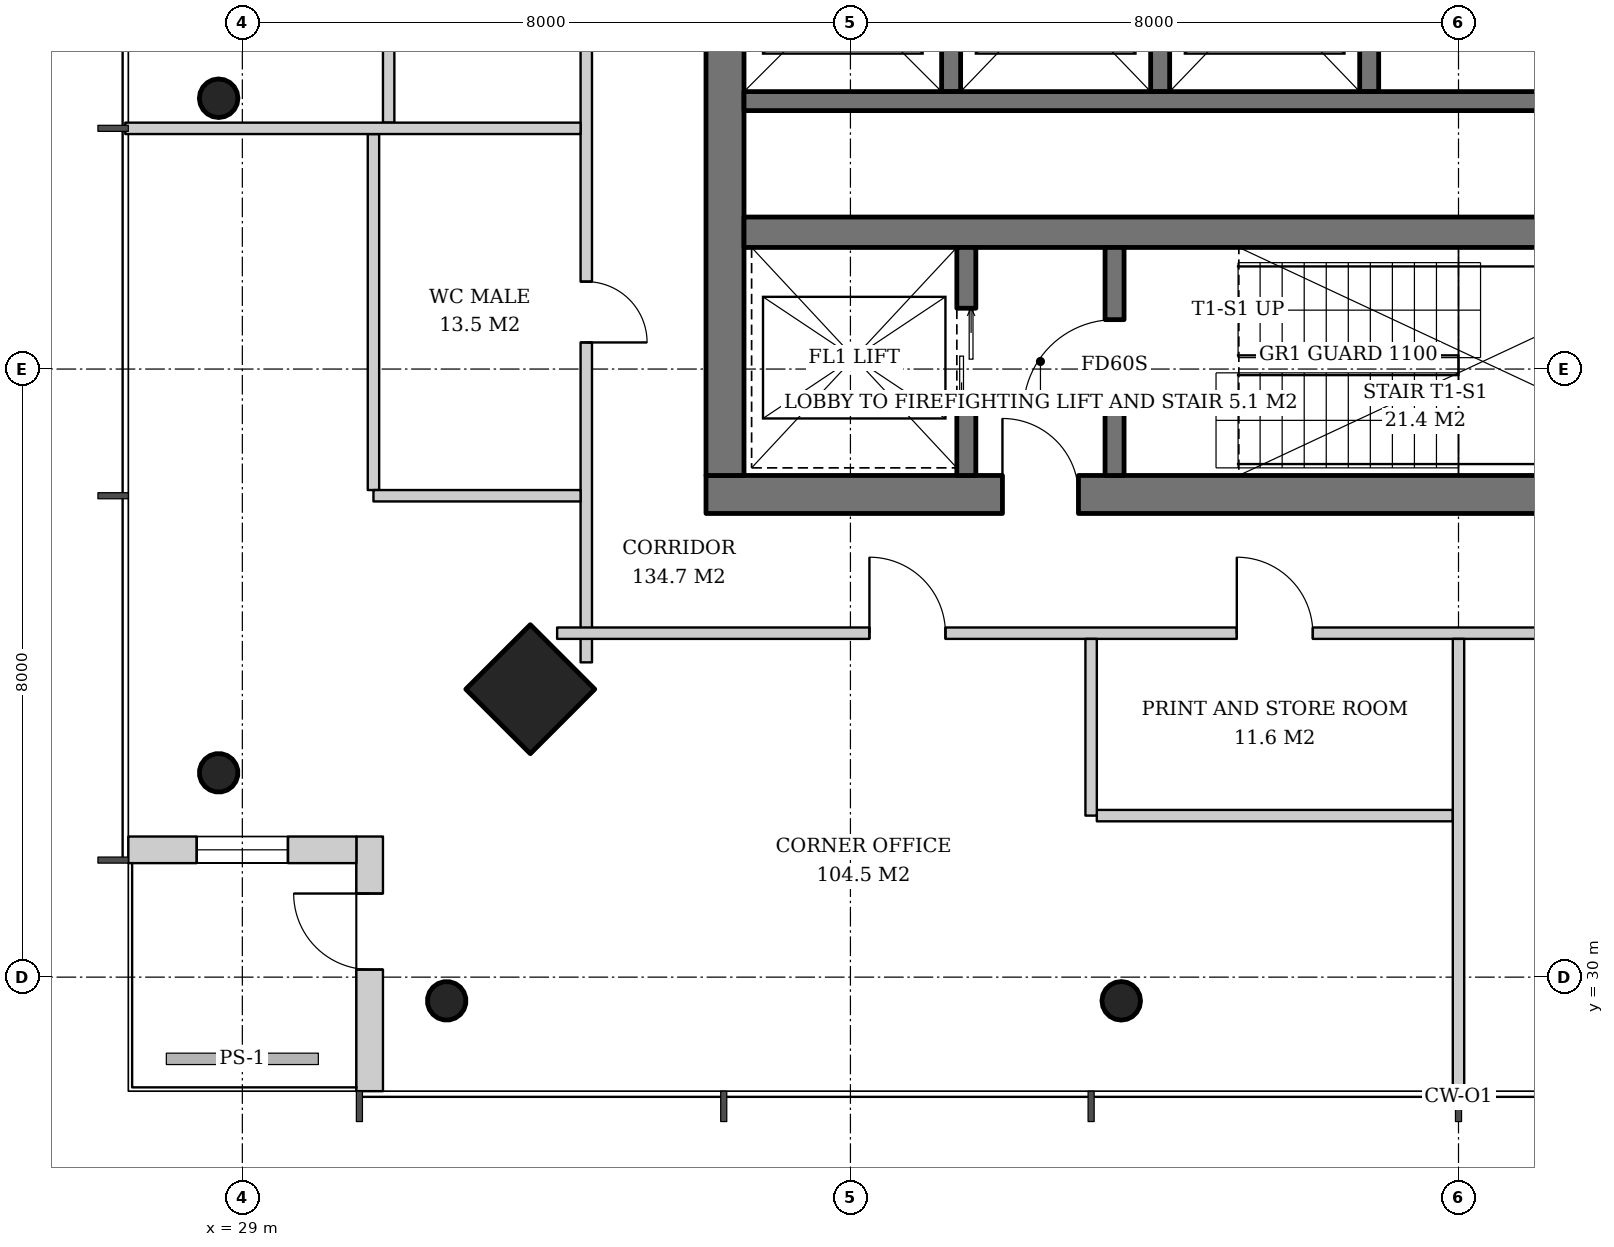
"""IFC4 building model, lengths in metres.
Left out: names, types, materials, properties, quantities, classifications, styles, units other than length and angle.
Written with IfcOpenShell. Run it as: python <this file> out.ifc"""

import sys

from ifc_helpers import new_model, si_unit, direction, frame, frame_2d, origin, origin_2d, place, context, subcontext, project, spatial, rectangle, hollow_circle, extrude, element, fill, save


model = new_model("IFC4")
c1 = context("Model", 3, precision=1e-05, world=origin(), true_north=direction((0.0, 1.0)))
c2 = subcontext(c1, "Body", "Model", "MODEL_VIEW")
j1 = project(units=[si_unit("LENGTHUNIT", "METRE"), si_unit("PLANEANGLEUNIT", "RADIAN")], contexts=[c1])
p1 = place(None, origin())
s1 = spatial("IfcSite", under=j1, at=p1, CompositionType="ELEMENT")
p2 = place(p1, origin())
s2 = spatial("IfcBuilding", under=s1, at=p2, CompositionType="ELEMENT")
p3 = place(p2, frame((0.0, 0.0, 260.4)))
s3 = spatial("IfcBuildingStorey", under=s2, at=p3, CompositionType="ELEMENT", Elevation=260.4)
p4 = place(p3, frame((32.75, 33.75, 0.0), z_axis=(0.031898107953, 0.031898107953, 0.998981992539), x_axis=(-0.707106781187, 0.707106781187, 0.0)))
e1 = element("IfcColumn", 1, at=p4, inside=s3, PredefinedType="COLUMN", context=c2, shape_type="SweptSolid", body=[
    extrude(rectangle(XDim=1.2, YDim=1.2, at=origin_2d()), origin(), (0.0, 0.0, 1.0), 3.804),
])
p5 = place(p3, frame((28.65, 32.65, 0.0), z_axis=(0.031962158256, 0.031962158256, 0.998977898093), x_axis=(-0.707106781187, 0.707106781187, 0.0)))
e2 = element("IfcColumn", 2, at=p5, inside=s3, PredefinedType="COLUMN", context=c2, shape_type="SweptSolid", body=[
    extrude(hollow_circle(Radius=0.254, WallThickness=0.02, at=origin_2d()), origin(), (0.0, 0.0, 1.0), 3.804),
])
p6 = place(p3, frame((28.65, 41.55, 0.0), z_axis=(0.031976680097, 0.010658893366, 0.999431778523), x_axis=(-0.316227766017, 0.948683298051, 0.0)))
e3 = element("IfcColumn", 3, at=p6, inside=s3, PredefinedType="COLUMN", context=c2, shape_type="SweptSolid", body=[
    extrude(hollow_circle(Radius=0.254, WallThickness=0.02, at=origin_2d()), origin(), (0.0, 0.0, 1.0), 3.802),
])
p7 = place(p3, frame((31.65, 29.65, 0.0), z_axis=(0.031962158256, 0.031962158256, 0.998977898093), x_axis=(-0.707106781187, 0.707106781187, 0.0)))
e4 = element("IfcColumn", 4, at=p7, inside=s3, PredefinedType="COLUMN", context=c2, shape_type="SweptSolid", body=[
    extrude(hollow_circle(Radius=0.254, WallThickness=0.02, at=origin_2d()), origin(), (0.0, 0.0, 1.0), 3.804),
])
p8 = place(p3, frame((40.55, 29.65, 0.0), z_axis=(0.010658893366, 0.031976680097, 0.999431778523), x_axis=(-0.948683298051, 0.316227766017, 0.0)))
e5 = element("IfcColumn", 5, at=p8, inside=s3, PredefinedType="COLUMN", context=c2, shape_type="SweptSolid", body=[
    extrude(hollow_circle(Radius=0.254, WallThickness=0.02, at=origin_2d()), origin(), (0.0, 0.0, 1.0), 3.802),
])
p9 = place(p3, frame((35.1, 36.35, 0.0), z_axis=(0.0, 0.0, 1.0), x_axis=(1.0, 0.0, 0.0)))
e6 = element("IfcWall", 6, at=p9, inside=s3, PredefinedType="SHEAR", context=c2, shape_type="SweptSolid", body=[
    extrude(rectangle(XDim=19.8, YDim=0.5, at=frame_2d((9.9, 0.0))), origin(), (0.0, 0.0, 1.0), 3.8),
])
p10 = place(p9, frame((3.9, 0.0, 0.0)))
e7 = element("IfcOpeningElement", 7, at=p10, cuts=e6, PredefinedType="OPENING", context=c2, shape_type="SweptSolid", body=[
    extrude(rectangle(XDim=1.0, YDim=2.1, at=frame_2d((0.5, 1.05))), frame((0.0, 0.26, 0.0), z_axis=(0.0, -1.0, 0.0), x_axis=(1.0, 0.0, 0.0)), (0.0, 0.0, 1.0), 0.52),
])
p11 = place(p9, frame((15.35, 0.0, 0.0)))
e8 = element("IfcOpeningElement", 8, at=p11, cuts=e6, PredefinedType="OPENING", context=c2, shape_type="SweptSolid", body=[
    extrude(rectangle(XDim=1.0, YDim=2.1, at=frame_2d((0.5, 1.05))), frame((0.0, 0.26, 0.0), z_axis=(0.0, -1.0, 0.0), x_axis=(1.0, 0.0, 0.0)), (0.0, 0.0, 1.0), 0.52),
])
p12 = place(p3, frame((35.35, 36.6, 0.0), z_axis=(0.0, 0.0, 1.0), x_axis=(0.0, 1.0, 0.0)))
e9 = element("IfcWall", 9, at=p12, inside=s3, PredefinedType="SHEAR", context=c2, shape_type="SweptSolid", body=[
    extrude(rectangle(XDim=18.8, YDim=0.5, at=frame_2d((9.4, 0.0))), origin(), (0.0, 0.0, 1.0), 3.8),
])
p13 = place(p12, frame((8.5, 0.0, 0.0)))
e10 = element("IfcOpeningElement", 10, at=p13, cuts=e9, PredefinedType="OPENING", context=c2, shape_type="SweptSolid", body=[
    extrude(rectangle(XDim=1.8, YDim=2.4, at=frame_2d((0.9, 1.2))), frame((0.0, 0.26, 0.0), z_axis=(0.0, -1.0, 0.0), x_axis=(1.0, 0.0, 0.0)), (0.0, 0.0, 1.0), 0.52),
])
p14 = place(p3, frame((35.6, 39.8, 0.0), z_axis=(0.0, 0.0, 1.0), x_axis=(1.0, 0.0, 0.0)))
e11 = element("IfcWall", 11, at=p14, inside=s3, PredefinedType="SHEAR", context=c2, shape_type="SweptSolid", body=[
    extrude(rectangle(XDim=18.8, YDim=0.4, at=frame_2d((9.4, 0.0))), origin(), (0.0, 0.0, 1.0), 3.8),
])
p15 = place(p3, frame((30.675, 28.5, 0.0), z_axis=(0.0, 0.0, 1.0), x_axis=(0.0, 1.0, 0.0)))
e12 = element("IfcWall", 12, at=p15, inside=s3, PredefinedType="SOLIDWALL", context=c2, shape_type="SweptSolid", body=[
    extrude(rectangle(XDim=3.35, YDim=0.35, at=frame_2d((1.675, 0.0))), origin(), (0.0, 0.0, 1.0), 3.62),
])
p16 = place(p15, frame((1.6, 0.0, 0.0)))
e13 = element("IfcOpeningElement", 13, at=p16, cuts=e12, PredefinedType="OPENING", context=c2, shape_type="SweptSolid", body=[
    extrude(rectangle(XDim=1.0, YDim=2.4, at=frame_2d((0.5, 1.2))), frame((0.0, 0.185, 0.0), z_axis=(0.0, -1.0, 0.0), x_axis=(1.0, 0.0, 0.0)), (0.0, 0.0, 1.0), 0.37),
])
p17 = place(p3, frame((30.5, 31.675, 0.0), z_axis=(0.0, 0.0, 1.0), x_axis=(-1.0, 0.0, 0.0)))
e14 = element("IfcWall", 14, at=p17, inside=s3, PredefinedType="SOLIDWALL", context=c2, shape_type="SweptSolid", body=[
    extrude(rectangle(XDim=3.0, YDim=0.35, at=frame_2d((1.5, 0.0))), origin(), (0.0, 0.0, 1.0), 3.62),
])
p18 = place(p17, frame((0.9, 0.0, 0.6)))
e15 = element("IfcOpeningElement", 15, at=p18, cuts=e14, PredefinedType="OPENING", context=c2, shape_type="SweptSolid", body=[
    extrude(rectangle(XDim=1.2, YDim=2.55, at=frame_2d((0.6, 1.275))), frame((0.0, 0.185, 0.0), z_axis=(0.0, -1.0, 0.0), x_axis=(1.0, 0.0, 0.0)), (0.0, 0.0, 1.0), 0.37),
])
p19 = place(p3, frame((38.525, 36.6, 0.0), z_axis=(0.0, 0.0, 1.0), x_axis=(0.0, 1.0, 0.0)))
e16 = element("IfcWall", 16, at=p19, inside=s3, PredefinedType="SHEAR", context=c2, shape_type="SweptSolid", body=[
    extrude(rectangle(XDim=3.0, YDim=0.25, at=frame_2d((1.5, 0.0))), origin(), (0.0, 0.0, 1.0), 3.8),
])
p20 = place(p19, frame((0.9, 0.0, 0.0)))
e17 = element("IfcOpeningElement", 17, at=p20, cuts=e16, PredefinedType="OPENING", context=c2, shape_type="SweptSolid", body=[
    extrude(rectangle(XDim=1.3, YDim=2.2, at=frame_2d((0.65, 1.1))), frame((0.0, 0.135, 0.0), z_axis=(0.0, -1.0, 0.0), x_axis=(1.0, 0.0, 0.0)), (0.0, 0.0, 1.0), 0.27),
])
p21 = place(p3, frame((40.475, 36.6, 0.0), z_axis=(0.0, 0.0, 1.0), x_axis=(0.0, 1.0, 0.0)))
e18 = element("IfcWall", 18, at=p21, inside=s3, PredefinedType="SHEAR", context=c2, shape_type="SweptSolid", body=[
    extrude(rectangle(XDim=3.0, YDim=0.25, at=frame_2d((1.5, 0.0))), origin(), (0.0, 0.0, 1.0), 3.8),
])
p22 = place(p21, frame((0.85, 0.0, 0.0)))
e19 = element("IfcOpeningElement", 19, at=p22, cuts=e18, PredefinedType="OPENING", context=c2, shape_type="SweptSolid", body=[
    extrude(rectangle(XDim=1.2, YDim=2.1, at=frame_2d((0.6, 1.05))), frame((0.0, 0.135, 0.0), z_axis=(0.0, -1.0, 0.0), x_axis=(1.0, 0.0, 0.0)), (0.0, 0.0, 1.0), 0.27),
])
for number, where, z_axis, x_axis in (
    (20, (38.325, 44.25, 0.0), (0.0, 0.0, 1.0), (0.0, -1.0, 0.0)),
    (21, (41.075, 44.25, 0.0), (0.0, 0.0, 1.0), (0.0, -1.0, 0.0)),
    (22, (43.825, 44.25, 0.0), (0.0, 0.0, 1.0), (0.0, -1.0, 0.0)),
):
    element("IfcWall", number, at=place(p3, frame(where, z_axis=z_axis, x_axis=x_axis)), inside=s3, PredefinedType="SHEAR", context=c2, shape_type="SweptSolid", body=[
        extrude(rectangle(XDim=2.6, YDim=0.25, at=frame_2d((1.3, 0.0))), origin(), (0.0, 0.0, 1.0), 3.8),
    ])
p23 = place(p3, frame((35.6, 41.525, 0.0), z_axis=(0.0, 0.0, 1.0), x_axis=(1.0, 0.0, 0.0)))
e23 = element("IfcWall", 23, at=p23, inside=s3, PredefinedType="SHEAR", context=c2, shape_type="SweptSolid", body=[
    extrude(rectangle(XDim=11.1, YDim=0.25, at=frame_2d((5.55, 0.0))), origin(), (0.0, 0.0, 1.0), 3.8),
])
p24 = place(p3, frame((30.925, 45.925, 0.0), z_axis=(0.0, 0.0, 1.0), x_axis=(0.0, -1.0, 0.0)))
e24 = element("IfcWall", 24, at=p24, inside=s3, PredefinedType="PARTITIONING", context=c2, shape_type="SweptSolid", body=[
    extrude(rectangle(XDim=4.683, YDim=0.15, at=frame_2d((2.342, 0.0))), origin(), (0.0, 0.0, 1.0), 3.12),
])
p25 = place(p3, frame((30.725, 41.092, 0.0), z_axis=(0.0, 0.0, 1.0), x_axis=(0.0, -1.0, 0.0)))
e25 = element("IfcWall", 25, at=p25, inside=s3, PredefinedType="PARTITIONING", context=c2, shape_type="SweptSolid", body=[
    extrude(rectangle(XDim=4.683, YDim=0.15, at=frame_2d((2.342, 0.0))), origin(), (0.0, 0.0, 1.0), 3.12),
])
p26 = place(p3, frame((33.525, 57.859, 0.0), z_axis=(0.0, 0.0, 1.0), x_axis=(0.0, -1.0, 0.0)))
e26 = element("IfcWall", 26, at=p26, inside=s3, PredefinedType="PARTITIONING", context=c2, shape_type="SweptSolid", body=[
    extrude(rectangle(XDim=23.717, YDim=0.15, at=frame_2d((11.859, 0.0))), origin(), (0.0, 0.0, 1.0), 3.02),
])
p27 = place(p26, frame((4.109, 0.0, 0.0)))
e27 = element("IfcOpeningElement", 27, at=p27, cuts=e26, PredefinedType="OPENING", context=c2, shape_type="SweptSolid", body=[
    extrude(rectangle(XDim=1.0, YDim=2.1, at=frame_2d((0.5, 1.05))), frame((0.0, 0.085, 0.0), z_axis=(0.0, -1.0, 0.0), x_axis=(1.0, 0.0, 0.0)), (0.0, 0.0, 1.0), 0.17),
])
p28 = place(p26, frame((9.042, 0.0, 0.0)))
e28 = element("IfcOpeningElement", 28, at=p28, cuts=e26, PredefinedType="OPENING", context=c2, shape_type="SweptSolid", body=[
    extrude(rectangle(XDim=0.8, YDim=2.1, at=frame_2d((0.4, 1.05))), frame((0.0, 0.085, 0.0), z_axis=(0.0, -1.0, 0.0), x_axis=(1.0, 0.0, 0.0)), (0.0, 0.0, 1.0), 0.17),
])
p29 = place(p26, frame((13.775, 0.0, 0.0)))
e29 = element("IfcOpeningElement", 29, at=p29, cuts=e26, PredefinedType="OPENING", context=c2, shape_type="SweptSolid", body=[
    extrude(rectangle(XDim=1.0, YDim=2.1, at=frame_2d((0.5, 1.05))), frame((0.0, 0.085, 0.0), z_axis=(0.0, -1.0, 0.0), x_axis=(1.0, 0.0, 0.0)), (0.0, 0.0, 1.0), 0.17),
])
p30 = place(p26, frame((18.708, 0.0, 0.0)))
e30 = element("IfcOpeningElement", 30, at=p30, cuts=e26, PredefinedType="OPENING", context=c2, shape_type="SweptSolid", body=[
    extrude(rectangle(XDim=0.8, YDim=2.1, at=frame_2d((0.4, 1.05))), frame((0.0, 0.085, 0.0), z_axis=(0.0, -1.0, 0.0), x_axis=(1.0, 0.0, 0.0)), (0.0, 0.0, 1.0), 0.17),
])
p31 = place(p3, frame((33.45, 41.167, 0.0), z_axis=(0.0, 0.0, 1.0), x_axis=(-1.0, 0.0, 0.0)))
e31 = element("IfcWall", 31, at=p31, inside=s3, PredefinedType="PARTITIONING", context=c2, shape_type="SweptSolid", body=[
    extrude(rectangle(XDim=5.99, YDim=0.15, at=frame_2d((2.995, 0.0))), origin(), (0.0, 0.0, 1.0), 3.12),
])
p32 = place(p3, frame((33.45, 36.333, 0.0), z_axis=(0.0, 0.0, 1.0), x_axis=(-1.0, 0.0, 0.0)))
e32 = element("IfcWall", 32, at=p32, inside=s3, PredefinedType="PARTITIONING", context=c2, shape_type="SweptSolid", body=[
    extrude(rectangle(XDim=2.725, YDim=0.15, at=frame_2d((1.362, 0.0))), origin(), (0.0, 0.0, 1.0), 3.62),
])
p33 = place(p3, frame((40.242, 32.125, 0.0), z_axis=(0.0, 0.0, 1.0), x_axis=(1.0, 0.0, 0.0)))
e33 = element("IfcWall", 33, at=p33, inside=s3, PredefinedType="PARTITIONING", context=c2, shape_type="SweptSolid", body=[
    extrude(rectangle(XDim=4.683, YDim=0.15, at=frame_2d((2.342, 0.0))), origin(), (0.0, 0.0, 1.0), 3.12),
])
p34 = place(p3, frame((33.141, 34.525, 0.0), z_axis=(0.0, 0.0, 1.0), x_axis=(1.0, 0.0, 0.0)))
e34 = element("IfcWall", 34, at=p34, inside=s3, PredefinedType="PARTITIONING", context=c2, shape_type="SweptSolid", body=[
    extrude(rectangle(XDim=23.717, YDim=0.15, at=frame_2d((11.859, 0.0))), origin(), (0.0, 0.0, 1.0), 3.02),
])
p35 = place(p34, frame((4.109, 0.0, 0.0)))
e35 = element("IfcOpeningElement", 35, at=p35, cuts=e34, PredefinedType="OPENING", context=c2, shape_type="SweptSolid", body=[
    extrude(rectangle(XDim=1.0, YDim=2.1, at=frame_2d((0.5, 1.05))), frame((0.0, 0.085, 0.0), z_axis=(0.0, -1.0, 0.0), x_axis=(1.0, 0.0, 0.0)), (0.0, 0.0, 1.0), 0.17),
])
p36 = place(p34, frame((8.942, 0.0, 0.0)))
e36 = element("IfcOpeningElement", 36, at=p36, cuts=e34, PredefinedType="OPENING", context=c2, shape_type="SweptSolid", body=[
    extrude(rectangle(XDim=1.0, YDim=2.1, at=frame_2d((0.5, 1.05))), frame((0.0, 0.085, 0.0), z_axis=(0.0, -1.0, 0.0), x_axis=(1.0, 0.0, 0.0)), (0.0, 0.0, 1.0), 0.17),
])
p37 = place(p34, frame((13.775, 0.0, 0.0)))
e37 = element("IfcOpeningElement", 37, at=p37, cuts=e34, PredefinedType="OPENING", context=c2, shape_type="SweptSolid", body=[
    extrude(rectangle(XDim=1.0, YDim=2.1, at=frame_2d((0.5, 1.05))), frame((0.0, 0.085, 0.0), z_axis=(0.0, -1.0, 0.0), x_axis=(1.0, 0.0, 0.0)), (0.0, 0.0, 1.0), 0.17),
])
p38 = place(p34, frame((18.609, 0.0, 0.0)))
e38 = element("IfcOpeningElement", 38, at=p38, cuts=e34, PredefinedType="OPENING", context=c2, shape_type="SweptSolid", body=[
    extrude(rectangle(XDim=1.0, YDim=2.1, at=frame_2d((0.5, 1.05))), frame((0.0, 0.085, 0.0), z_axis=(0.0, -1.0, 0.0), x_axis=(1.0, 0.0, 0.0)), (0.0, 0.0, 1.0), 0.17),
])
p39 = place(p3, frame((40.167, 34.45, 0.0), z_axis=(0.0, 0.0, 1.0), x_axis=(0.0, -1.0, 0.0)))
e39 = element("IfcWall", 39, at=p39, inside=s3, PredefinedType="PARTITIONING", context=c2, shape_type="SweptSolid", body=[
    extrude(rectangle(XDim=2.325, YDim=0.15, at=frame_2d((1.163, 0.0))), origin(), (0.0, 0.0, 1.0), 3.62),
])
p40 = place(p3, frame((45.0, 34.45, 0.0), z_axis=(0.0, 0.0, 1.0), x_axis=(0.0, -1.0, 0.0)))
e40 = element("IfcWall", 40, at=p40, inside=s3, PredefinedType="PARTITIONING", context=c2, shape_type="SweptSolid", body=[
    extrude(rectangle(XDim=5.99, YDim=0.15, at=frame_2d((2.995, 0.0))), origin(), (0.0, 0.0, 1.0), 3.12),
])
p41 = place(p16, origin())
e41 = element("IfcDoor", 41, at=p41, inside=s3, OperationType="SINGLE_SWING_RIGHT", PredefinedType="DOOR", context=c2, shape_type="SweptSolid", body=[
    extrude(rectangle(XDim=1.0, YDim=2.4, at=frame_2d((0.5, 1.2))), frame((0.0, 0.025, 0.0), z_axis=(0.0, -1.0, 0.0), x_axis=(1.0, 0.0, 0.0)), (0.0, 0.0, 1.0), 0.05),
])
fill(e13, e41)
p42 = place(p18, origin())
e42 = element("IfcWindow", 42, at=p42, inside=s3, PartitioningType="SINGLE_PANEL", PredefinedType="WINDOW", context=c2, shape_type="SweptSolid", body=[
    extrude(rectangle(XDim=1.2, YDim=2.55, at=frame_2d((0.6, 1.275))), frame((0.0, 0.03, 0.0), z_axis=(0.0, -1.0, 0.0), x_axis=(1.0, 0.0, 0.0)), (0.0, 0.0, 1.0), 0.06),
])
fill(e15, e42)
p43 = place(p20, origin())
e43 = element("IfcDoor", 43, at=p43, inside=s3, OperationType="DOUBLE_DOOR_SLIDING", PredefinedType="DOOR", context=c2, shape_type="SweptSolid", body=[
    extrude(rectangle(XDim=1.3, YDim=2.2, at=frame_2d((0.65, 1.1))), frame((0.0, 0.025, 0.0), z_axis=(0.0, -1.0, 0.0), x_axis=(1.0, 0.0, 0.0)), (0.0, 0.0, 1.0), 0.05),
])
fill(e17, e43)
p44 = place(p22, origin())
e44 = element("IfcDoor", 44, at=p44, inside=s3, OperationType="SINGLE_SWING_LEFT", PredefinedType="DOOR", context=c2, shape_type="SweptSolid", body=[
    extrude(rectangle(XDim=1.2, YDim=2.1, at=frame_2d((0.6, 1.05))), frame((0.0, 0.025, 0.0), z_axis=(0.0, -1.0, 0.0), x_axis=(1.0, 0.0, 0.0)), (0.0, 0.0, 1.0), 0.05),
])
fill(e19, e44)
p45 = place(p10, origin())
e45 = element("IfcDoor", 45, at=p45, inside=s3, OperationType="SINGLE_SWING_LEFT", PredefinedType="DOOR", context=c2, shape_type="SweptSolid", body=[
    extrude(rectangle(XDim=1.0, YDim=2.1, at=frame_2d((0.5, 1.05))), frame((0.0, 0.025, 0.0), z_axis=(0.0, -1.0, 0.0), x_axis=(1.0, 0.0, 0.0)), (0.0, 0.0, 1.0), 0.05),
])
fill(e7, e45)
p46 = place(p30, origin())
e46 = element("IfcDoor", 46, at=p46, inside=s3, OperationType="SINGLE_SWING_RIGHT", PredefinedType="DOOR", context=c2, shape_type="SweptSolid", body=[
    extrude(rectangle(XDim=0.8, YDim=2.1, at=frame_2d((0.4, 1.05))), frame((0.0, 0.025, 0.0), z_axis=(0.0, -1.0, 0.0), x_axis=(1.0, 0.0, 0.0)), (0.0, 0.0, 1.0), 0.05),
])
fill(e30, e46)
p47 = place(p35, origin())
e47 = element("IfcDoor", 47, at=p47, inside=s3, OperationType="SINGLE_SWING_LEFT", PredefinedType="DOOR", context=c2, shape_type="SweptSolid", body=[
    extrude(rectangle(XDim=1.0, YDim=2.1, at=frame_2d((0.5, 1.05))), frame((0.0, 0.025, 0.0), z_axis=(0.0, -1.0, 0.0), x_axis=(1.0, 0.0, 0.0)), (0.0, 0.0, 1.0), 0.05),
])
fill(e35, e47)
p48 = place(p36, origin())
e48 = element("IfcDoor", 48, at=p48, inside=s3, OperationType="SINGLE_SWING_LEFT", PredefinedType="DOOR", context=c2, shape_type="SweptSolid", body=[
    extrude(rectangle(XDim=1.0, YDim=2.1, at=frame_2d((0.5, 1.05))), frame((0.0, 0.025, 0.0), z_axis=(0.0, -1.0, 0.0), x_axis=(1.0, 0.0, 0.0)), (0.0, 0.0, 1.0), 0.05),
])
fill(e36, e48)
save(model, sys.argv[1])
